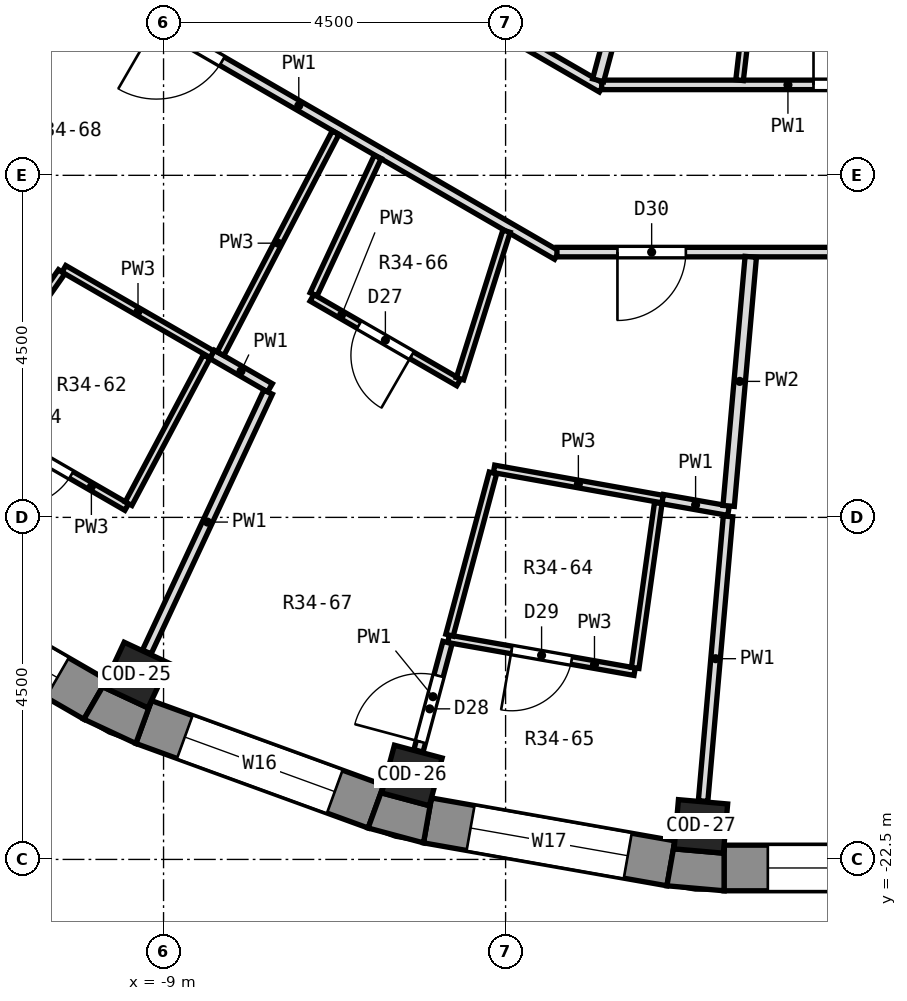
"""IFC4 building model, lengths in metres.
Left out: names, types, materials, properties, quantities, classifications, styles, units other than length and angle.
Written with IfcOpenShell. Run it as: python <this file> out.ifc"""

import sys

from ifc_helpers import new_model, si_unit, direction, frame, frame_2d, origin, origin_2d, place, context, subcontext, project, spatial, polyline, rectangle, outline, extrude, element, fill, save


model = new_model("IFC4")
c1 = context("Model", 3, precision=1e-05, world=origin(), true_north=direction((0.0, 1.0)))
c2 = subcontext(c1, "Body", "Model", "MODEL_VIEW")
j1 = project(units=[si_unit("LENGTHUNIT", "METRE"), si_unit("PLANEANGLEUNIT", "RADIAN")], contexts=[c1])
p1 = place(None, origin())
s1 = spatial("IfcSite", under=j1, at=p1, CompositionType="ELEMENT")
p2 = place(p1, origin())
s2 = spatial("IfcBuilding", under=s1, at=p2, CompositionType="ELEMENT")
p3 = place(p2, frame((0.0, 0.0, 239.6)))
s3 = spatial("IfcBuildingStorey", under=s2, at=p3, CompositionType="ELEMENT", Elevation=239.6)
for number, where, z_axis, x_axis in (
    (1, (-9.361, -20.075, 0.0), (0.0, 0.0, 1.0), (-0.423, -0.906, 0.0)),
    (2, (-5.733, -21.395, 0.0), (0.0, 0.0, 1.0), (-0.259, -0.966, 0.0)),
    (3, (-1.93, -22.066, 0.0), (0.0, 0.0, 1.0), (-0.087, -0.996, 0.0)),
):
    element("IfcColumn", number, at=place(p3, frame(where, z_axis=z_axis, x_axis=x_axis)), inside=s3, PredefinedType="COLUMN", context=c2, shape_type="SweptSolid", body=[
        extrude(rectangle(XDim=0.65, YDim=0.65, at=origin_2d()), origin(), (0.0, 0.0, 1.0), 3.3),
    ])
p4 = place(p3, frame((-12.714, -18.77, 0.0), z_axis=(0.0, 0.0, 1.0), x_axis=(0.866016800201, -0.500014901547, 0.0)))
e4 = element("IfcWall", 4, at=p4, inside=s3, PredefinedType="SOLIDWALL", context=c2, shape_type="SweptSolid", body=[
    extrude(rectangle(XDim=3.252, YDim=0.6, at=frame_2d((1.626, 0.0))), origin(), (0.0, 0.0, 1.0), 2.9),
])
p5 = place(p4, frame((0.576, 0.0, 0.9)))
e5 = element("IfcOpeningElement", 5, at=p5, cuts=e4, PredefinedType="OPENING", context=c2, shape_type="SweptSolid", body=[
    extrude(rectangle(XDim=2.1, YDim=1.8, at=frame_2d((1.05, 0.9))), frame((0.0, 0.312, 0.0), z_axis=(0.0, -1.0, 0.0), x_axis=(1.0, 0.0, 0.0)), (0.0, 0.0, 1.0), 0.624),
])
p6 = place(p3, frame((-9.262, -20.693, 0.0), z_axis=(0.0, 0.0, 1.0), x_axis=(0.939679383794, -0.342056509473, 0.0)))
e6 = element("IfcWall", 6, at=p6, inside=s3, PredefinedType="SOLIDWALL", context=c2, shape_type="SweptSolid", body=[
    extrude(rectangle(XDim=3.252, YDim=0.6, at=frame_2d((1.626, 0.0))), origin(), (0.0, 0.0, 1.0), 2.9),
])
p7 = place(p6, frame((0.576, 0.0, 0.9)))
e7 = element("IfcOpeningElement", 7, at=p7, cuts=e6, PredefinedType="OPENING", context=c2, shape_type="SweptSolid", body=[
    extrude(rectangle(XDim=2.1, YDim=1.8, at=frame_2d((1.05, 0.9))), frame((0.0, 0.312, 0.0), z_axis=(0.0, -1.0, 0.0), x_axis=(1.0, 0.0, 0.0)), (0.0, 0.0, 1.0), 0.624),
])
p8 = place(p3, frame((-5.528, -21.987, 0.0), z_axis=(0.0, 0.0, 1.0), x_axis=(0.984806225186, -0.173656842178, 0.0)))
e8 = element("IfcWall", 8, at=p8, inside=s3, PredefinedType="SOLIDWALL", context=c2, shape_type="SweptSolid", body=[
    extrude(rectangle(XDim=3.252, YDim=0.6, at=frame_2d((1.626, 0.0))), origin(), (0.0, 0.0, 1.0), 2.9),
])
p9 = place(p8, frame((0.576, 0.0, 0.9)))
e9 = element("IfcOpeningElement", 9, at=p9, cuts=e8, PredefinedType="OPENING", context=c2, shape_type="SweptSolid", body=[
    extrude(rectangle(XDim=2.1, YDim=1.8, at=frame_2d((1.05, 0.9))), frame((0.0, 0.312, 0.0), z_axis=(0.0, -1.0, 0.0), x_axis=(1.0, 0.0, 0.0)), (0.0, 0.0, 1.0), 0.624),
])
p10 = place(p3, frame((-1.626, -22.613, 0.0), z_axis=(0.0, 0.0, 1.0), x_axis=(1.0, 0.0, 0.0)))
e10 = element("IfcWall", 10, at=p10, inside=s3, PredefinedType="SOLIDWALL", context=c2, shape_type="SweptSolid", body=[
    extrude(rectangle(XDim=3.251, YDim=0.6, at=frame_2d((1.626, 0.0))), origin(), (0.0, 0.0, 1.0), 2.9),
])
p11 = place(p10, frame((0.576, 0.0, 0.9)))
e11 = element("IfcOpeningElement", 11, at=p11, cuts=e10, PredefinedType="OPENING", context=c2, shape_type="SweptSolid", body=[
    extrude(rectangle(XDim=2.1, YDim=1.8, at=frame_2d((1.05, 0.9))), frame((0.0, 0.312, 0.0), z_axis=(0.0, -1.0, 0.0), x_axis=(1.0, 0.0, 0.0)), (0.0, 0.0, 1.0), 0.624),
])
p12 = place(p3, origin())
e12 = element("IfcWall", 12, at=p12, inside=s3, PredefinedType="SOLIDWALL", context=c2, shape_type="SweptSolid", body=[
    extrude(outline(polyline([(-10.048, -20.656), (-9.364, -20.975), (-9.159, -20.411), (-9.204, -20.507), (-9.793, -20.232), (-9.748, -20.136), (-10.048, -20.656)])), origin(), (0.0, 0.0, 1.0), 2.9),
])
p13 = place(p3, origin())
e13 = element("IfcWall", 13, at=p13, inside=s3, PredefinedType="SOLIDWALL", context=c2, shape_type="SweptSolid", body=[
    extrude(outline(polyline([(-5.58, -22.282), (-5.476, -21.691), (-5.503, -21.793), (-6.131, -21.625), (-6.104, -21.523), (-6.309, -22.087), (-5.58, -22.282)])), origin(), (0.0, 0.0, 1.0), 2.9),
])
p14 = place(p3, origin())
e14 = element("IfcWall", 14, at=p14, inside=s3, PredefinedType="SOLIDWALL", context=c2, shape_type="SweptSolid", body=[
    extrude(outline(polyline([(-2.378, -22.847), (-1.626, -22.913), (-1.626, -22.312), (-1.635, -22.418), (-2.283, -22.361), (-2.273, -22.256), (-2.378, -22.847)])), origin(), (0.0, 0.0, 1.0), 2.9),
])
p15 = place(p3, frame((-10.618, -10.615, 0.0), z_axis=(0.0, 0.0, 1.0), x_axis=(0.865323364785, -0.501214000561, 0.0)))
e15 = element("IfcWall", 15, at=p15, inside=s3, PredefinedType="PARTITIONING", context=c2, shape_type="SweptSolid", body=[
    extrude(rectangle(XDim=7.851, YDim=0.125, at=frame_2d((3.926, 0.0))), origin(), (0.0, 0.0, 1.0), 2.9),
])
p16 = place(p15, frame((1.76, 0.0, 0.0)))
e16 = element("IfcOpeningElement", 16, at=p16, cuts=e15, PredefinedType="OPENING", context=c2, shape_type="SweptSolid", body=[
    extrude(rectangle(XDim=1.0, YDim=2.1, at=frame_2d((0.5, 1.05))), frame((0.0, 0.074, 0.0), z_axis=(0.0, -1.0, 0.0), x_axis=(1.0, 0.0, 0.0)), (0.0, 0.0, 1.0), 0.149),
])
p17 = place(p3, frame((-8.953, -9.036, 0.0), z_axis=(0.0, 0.0, 1.0), x_axis=(0.865185064951, -0.501452693068, 0.0)))
e17 = element("IfcWall", 17, at=p17, inside=s3, PredefinedType="PARTITIONING", context=c2, shape_type="SweptSolid", body=[
    extrude(rectangle(XDim=6.609, YDim=0.125, at=frame_2d((3.304, 0.0))), origin(), (0.0, 0.0, 1.0), 2.9),
])
p18 = place(p17, frame((2.685, 0.0, 0.0)))
e18 = element("IfcOpeningElement", 18, at=p18, cuts=e17, PredefinedType="OPENING", context=c2, shape_type="SweptSolid", body=[
    extrude(rectangle(XDim=1.0, YDim=2.1, at=frame_2d((0.5, 1.05))), frame((0.0, 0.074, 0.0), z_axis=(0.0, -1.0, 0.0), x_axis=(1.0, 0.0, 0.0)), (0.0, 0.0, 1.0), 0.149),
])
p19 = place(p3, frame((-11.638, -16.62, 0.0), z_axis=(0.0, 0.0, 1.0), x_axis=(0.865981260576, -0.500076450486, 0.0)))
e19 = element("IfcWall", 19, at=p19, inside=s3, PredefinedType="PARTITIONING", context=c2, shape_type="SweptSolid", body=[
    extrude(rectangle(XDim=2.487, YDim=0.1, at=frame_2d((1.244, 0.0))), origin(), (0.0, 0.0, 1.0), 2.9),
])
p20 = place(p19, frame((0.844, 0.0, 0.0)))
e20 = element("IfcOpeningElement", 20, at=p20, cuts=e19, PredefinedType="OPENING", context=c2, shape_type="SweptSolid", body=[
    extrude(rectangle(XDim=0.8, YDim=2.1, at=frame_2d((0.4, 1.05))), frame((0.0, 0.062, 0.0), z_axis=(0.0, -1.0, 0.0), x_axis=(1.0, 0.0, 0.0)), (0.0, 0.0, 1.0), 0.124),
])
p21 = place(p3, frame((-10.311, -14.73, 0.0), z_axis=(0.0, 0.0, 1.0), x_axis=(0.866073680794, -0.499916372443, 0.0)))
e21 = element("IfcWall", 21, at=p21, inside=s3, PredefinedType="PARTITIONING", context=c2, shape_type="SweptSolid", body=[
    extrude(rectangle(XDim=2.252, YDim=0.1, at=frame_2d((1.126, 0.0))), origin(), (0.0, 0.0, 1.0), 2.9),
])
p22 = place(p3, frame((-8.361, -15.856, 0.0), z_axis=(0.0, 0.0, 1.0), x_axis=(0.865838315616, -0.500323906295, 0.0)))
e22 = element("IfcWall", 22, at=p22, inside=s3, PredefinedType="PARTITIONING", context=c2, shape_type="SweptSolid", body=[
    extrude(rectangle(XDim=0.878, YDim=0.125, at=frame_2d((0.439, 0.0))), origin(), (0.0, 0.0, 1.0), 2.9),
])
p23 = place(p3, frame((-7.047, -15.111, 0.0), z_axis=(0.0, 0.0, 1.0), x_axis=(0.866015874633, -0.500016504612, 0.0)))
e23 = element("IfcWall", 23, at=p23, inside=s3, PredefinedType="PARTITIONING", context=c2, shape_type="SweptSolid", body=[
    extrude(rectangle(XDim=2.228, YDim=0.1, at=frame_2d((1.114, 0.0))), origin(), (0.0, 0.0, 1.0), 2.9),
])
p24 = place(p23, frame((0.715, 0.0, 0.0)))
e24 = element("IfcOpeningElement", 24, at=p24, cuts=e23, PredefinedType="OPENING", context=c2, shape_type="SweptSolid", body=[
    extrude(rectangle(XDim=0.8, YDim=2.1, at=frame_2d((0.4, 1.05))), frame((0.0, 0.062, 0.0), z_axis=(0.0, -1.0, 0.0), x_axis=(1.0, 0.0, 0.0)), (0.0, 0.0, 1.0), 0.124),
])
p25 = place(p3, frame((-4.652, -17.362, 0.0), z_axis=(0.0, 0.0, 1.0), x_axis=(0.984302107819, -0.176491814379, 0.0)))
e25 = element("IfcWall", 25, at=p25, inside=s3, PredefinedType="PARTITIONING", context=c2, shape_type="SweptSolid", body=[
    extrude(rectangle(XDim=2.253, YDim=0.1, at=frame_2d((1.127, 0.0))), origin(), (0.0, 0.0, 1.0), 2.9),
])
p26 = place(p3, frame((-5.251, -19.598, 0.0), z_axis=(0.0, 0.0, 1.0), x_axis=(0.984786523671, -0.17376853224, 0.0)))
e26 = element("IfcWall", 26, at=p26, inside=s3, PredefinedType="PARTITIONING", context=c2, shape_type="SweptSolid", body=[
    extrude(rectangle(XDim=2.487, YDim=0.1, at=frame_2d((1.243, 0.0))), origin(), (0.0, 0.0, 1.0), 2.9),
])
p27 = place(p26, frame((0.844, 0.0, 0.0)))
e27 = element("IfcOpeningElement", 27, at=p27, cuts=e26, PredefinedType="OPENING", context=c2, shape_type="SweptSolid", body=[
    extrude(rectangle(XDim=0.8, YDim=2.1, at=frame_2d((0.4, 1.05))), frame((0.0, 0.062, 0.0), z_axis=(0.0, -1.0, 0.0), x_axis=(1.0, 0.0, 0.0)), (0.0, 0.0, 1.0), 0.124),
])
p28 = place(p3, frame((-2.434, -17.76, 0.0), z_axis=(0.0, 0.0, 1.0), x_axis=(0.984908951539, -0.173073271124, 0.0)))
e28 = element("IfcWall", 28, at=p28, inside=s3, PredefinedType="PARTITIONING", context=c2, shape_type="SweptSolid", body=[
    extrude(rectangle(XDim=0.88, YDim=0.125, at=frame_2d((0.44, 0.0))), origin(), (0.0, 0.0, 1.0), 2.9),
])
p29 = place(p3, frame((-3.824, -14.51, 0.0), z_axis=(0.0, 0.0, 1.0), x_axis=(1.0, 0.0, 0.0)))
e29 = element("IfcWall", 29, at=p29, inside=s3, PredefinedType="PARTITIONING", context=c2, shape_type="SweptSolid", body=[
    extrude(rectangle(XDim=7.785, YDim=0.125, at=frame_2d((3.892, 0.0))), origin(), (0.0, 0.0, 1.0), 2.9),
])
p30 = place(p29, frame((0.796, 0.0, 0.0)))
e30 = element("IfcOpeningElement", 30, at=p30, cuts=e29, PredefinedType="OPENING", context=c2, shape_type="SweptSolid", body=[
    extrude(rectangle(XDim=0.9, YDim=2.1, at=frame_2d((0.45, 1.05))), frame((0.0, 0.074, 0.0), z_axis=(0.0, -1.0, 0.0), x_axis=(1.0, 0.0, 0.0)), (0.0, 0.0, 1.0), 0.149),
])
p31 = place(p29, frame((4.634, 0.0, 0.0)))
e31 = element("IfcOpeningElement", 31, at=p31, cuts=e29, PredefinedType="OPENING", context=c2, shape_type="SweptSolid", body=[
    extrude(rectangle(XDim=1.0, YDim=2.1, at=frame_2d((0.5, 1.05))), frame((0.0, 0.074, 0.0), z_axis=(0.0, -1.0, 0.0), x_axis=(1.0, 0.0, 0.0)), (0.0, 0.0, 1.0), 0.149),
])
p32 = place(p3, frame((-3.236, -12.31, 0.0), z_axis=(0.0, 0.0, 1.0), x_axis=(1.0, 0.0, 0.0)))
e32 = element("IfcWall", 32, at=p32, inside=s3, PredefinedType="PARTITIONING", context=c2, shape_type="SweptSolid", body=[
    extrude(rectangle(XDim=6.62, YDim=0.125, at=frame_2d((3.31, 0.0))), origin(), (0.0, 0.0, 1.0), 2.9),
])
p33 = place(p32, frame((2.787, 0.0, 0.0)))
e33 = element("IfcOpeningElement", 33, at=p33, cuts=e32, PredefinedType="OPENING", context=c2, shape_type="SweptSolid", body=[
    extrude(rectangle(XDim=1.0, YDim=2.1, at=frame_2d((0.5, 1.05))), frame((0.0, 0.074, 0.0), z_axis=(0.0, -1.0, 0.0), x_axis=(1.0, 0.0, 0.0)), (0.0, 0.0, 1.0), 0.149),
])
p34 = place(p3, frame((-11.609, -16.579, 0.0), z_axis=(0.0, 0.0, 1.0), x_axis=(0.574033341126, 0.818831926146, 0.0)))
e34 = element("IfcWall", 34, at=p34, inside=s3, PredefinedType="PARTITIONING", context=c2, shape_type="SweptSolid", body=[
    extrude(rectangle(XDim=2.209, YDim=0.1, at=frame_2d((1.104, 0.0))), origin(), (0.0, 0.0, 1.0), 2.9),
])
p35 = place(p3, frame((-9.46, -17.82, 0.0), z_axis=(0.0, 0.0, 1.0), x_axis=(0.469111743442, 0.883138818174, 0.0)))
e35 = element("IfcWall", 35, at=p35, inside=s3, PredefinedType="PARTITIONING", context=c2, shape_type="SweptSolid", body=[
    extrude(rectangle(XDim=2.189, YDim=0.1, at=frame_2d((1.095, 0.0))), origin(), (0.0, 0.0, 1.0), 2.9),
])
p36 = place(p3, frame((-8.25, -15.847, 0.0), z_axis=(0.0, 0.0, 1.0), x_axis=(0.461751333764, 0.887009416955, 0.0)))
e36 = element("IfcWall", 36, at=p36, inside=s3, PredefinedType="PARTITIONING", context=c2, shape_type="SweptSolid", body=[
    extrude(rectangle(XDim=3.278, YDim=0.1, at=frame_2d((1.639, 0.0))), origin(), (0.0, 0.0, 1.0), 2.9),
])
p37 = place(p3, frame((-9.22, -19.771, 0.0), z_axis=(0.0, 0.0, 1.0), x_axis=(0.422998854506, 0.906130216408, 0.0)))
e37 = element("IfcWall", 37, at=p37, inside=s3, PredefinedType="PARTITIONING", context=c2, shape_type="SweptSolid", body=[
    extrude(rectangle(XDim=3.772, YDim=0.125, at=frame_2d((1.886, 0.0))), origin(), (0.0, 0.0, 1.0), 2.9),
])
p38 = place(p3, frame((-7.026, -15.066, 0.0), z_axis=(0.0, 0.0, 1.0), x_axis=(0.422771582019, 0.906236276827, 0.0)))
e38 = element("IfcWall", 38, at=p38, inside=s3, PredefinedType="PARTITIONING", context=c2, shape_type="SweptSolid", body=[
    extrude(rectangle(XDim=1.995, YDim=0.1, at=frame_2d((0.998, 0.0))), origin(), (0.0, 0.0, 1.0), 2.9),
])
p39 = place(p3, frame((-5.1, -16.176, 0.0), z_axis=(0.0, 0.0, 1.0), x_axis=(0.300861627233, 0.953667804457, 0.0)))
e39 = element("IfcWall", 39, at=p39, inside=s3, PredefinedType="PARTITIONING", context=c2, shape_type="SweptSolid", body=[
    extrude(rectangle(XDim=2.036, YDim=0.1, at=frame_2d((1.018, 0.0))), origin(), (0.0, 0.0, 1.0), 2.9),
])
p40 = place(p3, frame((-5.646, -21.072, 0.0), z_axis=(0.0, 0.0, 1.0), x_axis=(0.259237722608, 0.965813544726, 0.0)))
e40 = element("IfcWall", 40, at=p40, inside=s3, PredefinedType="PARTITIONING", context=c2, shape_type="SweptSolid", body=[
    extrude(rectangle(XDim=1.476, YDim=0.125, at=frame_2d((0.738, 0.0))), origin(), (0.0, 0.0, 1.0), 2.9),
])
p41 = place(p40, frame((0.122, 0.0, 0.0)))
e41 = element("IfcOpeningElement", 41, at=p41, cuts=e40, PredefinedType="OPENING", context=c2, shape_type="SweptSolid", body=[
    extrude(rectangle(XDim=0.9, YDim=2.1, at=frame_2d((0.45, 1.05))), frame((0.0, 0.074, 0.0), z_axis=(0.0, -1.0, 0.0), x_axis=(1.0, 0.0, 0.0)), (0.0, 0.0, 1.0), 0.149),
])
p42 = place(p3, frame((-5.238, -19.55, 0.0), z_axis=(0.0, 0.0, 1.0), x_axis=(0.258653207269, 0.965970247145, 0.0)))
e42 = element("IfcWall", 42, at=p42, inside=s3, PredefinedType="PARTITIONING", context=c2, shape_type="SweptSolid", body=[
    extrude(rectangle(XDim=2.209, YDim=0.1, at=frame_2d((1.104, 0.0))), origin(), (0.0, 0.0, 1.0), 2.9),
])
p43 = place(p3, frame((-3.282, -12.25, 0.0), z_axis=(0.0, 0.0, 1.0), x_axis=(0.258727295272, 0.965950405912, 0.0)))
e43 = element("IfcWall", 43, at=p43, inside=s3, PredefinedType="PARTITIONING", context=c2, shape_type="SweptSolid", body=[
    extrude(rectangle(XDim=3.24, YDim=0.15, at=frame_2d((1.62, 0.0))), origin(), (0.0, 0.0, 1.0), 2.9),
])
p44 = place(p3, frame((-2.795, -19.98, 0.0), z_axis=(0.0, 0.0, 1.0), x_axis=(0.138656596978, 0.990340521293, 0.0)))
e44 = element("IfcWall", 44, at=p44, inside=s3, PredefinedType="PARTITIONING", context=c2, shape_type="SweptSolid", body=[
    extrude(rectangle(XDim=2.189, YDim=0.1, at=frame_2d((1.094, 0.0))), origin(), (0.0, 0.0, 1.0), 2.9),
])
p45 = place(p3, frame((-1.422, -12.248, 0.0), z_axis=(0.0, 0.0, 1.0), x_axis=(0.115209091431, 0.993341263238, 0.0)))
e45 = element("IfcWall", 45, at=p45, inside=s3, PredefinedType="PARTITIONING", context=c2, shape_type="SweptSolid", body=[
    extrude(rectangle(XDim=1.901, YDim=0.1, at=frame_2d((0.95, 0.0))), origin(), (0.0, 0.0, 1.0), 2.9),
])
p46 = place(p45, frame((0.544, 0.0, 0.0)))
e46 = element("IfcOpeningElement", 46, at=p46, cuts=e45, PredefinedType="OPENING", context=c2, shape_type="SweptSolid", body=[
    extrude(rectangle(XDim=0.8, YDim=2.1, at=frame_2d((0.4, 1.05))), frame((0.0, 0.062, 0.0), z_axis=(0.0, -1.0, 0.0), x_axis=(1.0, 0.0, 0.0)), (0.0, 0.0, 1.0), 0.124),
])
p47 = place(p3, frame((-1.565, -17.849, 0.0), z_axis=(0.0, 0.0, 1.0), x_axis=(0.088454711903, 0.996080199553, 0.0)))
e47 = element("IfcWall", 47, at=p47, inside=s3, PredefinedType="PARTITIONING", context=c2, shape_type="SweptSolid", body=[
    extrude(rectangle(XDim=3.29, YDim=0.15, at=frame_2d((1.645, 0.0))), origin(), (0.0, 0.0, 1.0), 2.9),
])
p48 = place(p3, frame((-1.902, -21.732, 0.0), z_axis=(0.0, 0.0, 1.0), x_axis=(0.087279731719, 0.996183842687, 0.0)))
e48 = element("IfcWall", 48, at=p48, inside=s3, PredefinedType="PARTITIONING", context=c2, shape_type="SweptSolid", body=[
    extrude(rectangle(XDim=3.76, YDim=0.125, at=frame_2d((1.88, 0.0))), origin(), (0.0, 0.0, 1.0), 2.9),
])
p49 = place(p5, origin())
e49 = element("IfcWindow", 49, at=p49, inside=s3, PartitioningType="SINGLE_PANEL", PredefinedType="WINDOW", context=c2, shape_type="SweptSolid", body=[
    extrude(rectangle(XDim=2.1, YDim=1.8, at=frame_2d((1.05, 0.9))), frame((0.0, 0.18, 0.0), z_axis=(0.0, -1.0, 0.0), x_axis=(1.0, 0.0, 0.0)), (0.0, 0.0, 1.0), 0.06),
])
fill(e5, e49)
p50 = place(p7, origin())
e50 = element("IfcWindow", 50, at=p50, inside=s3, PartitioningType="SINGLE_PANEL", PredefinedType="WINDOW", context=c2, shape_type="SweptSolid", body=[
    extrude(rectangle(XDim=2.1, YDim=1.8, at=frame_2d((1.05, 0.9))), frame((0.0, 0.18, 0.0), z_axis=(0.0, -1.0, 0.0), x_axis=(1.0, 0.0, 0.0)), (0.0, 0.0, 1.0), 0.06),
])
fill(e7, e50)
p51 = place(p9, origin())
e51 = element("IfcWindow", 51, at=p51, inside=s3, PartitioningType="SINGLE_PANEL", PredefinedType="WINDOW", context=c2, shape_type="SweptSolid", body=[
    extrude(rectangle(XDim=2.1, YDim=1.8, at=frame_2d((1.05, 0.9))), frame((0.0, 0.18, 0.0), z_axis=(0.0, -1.0, 0.0), x_axis=(1.0, 0.0, 0.0)), (0.0, 0.0, 1.0), 0.06),
])
fill(e9, e51)
p52 = place(p11, origin())
e52 = element("IfcWindow", 52, at=p52, inside=s3, PartitioningType="SINGLE_PANEL", PredefinedType="WINDOW", context=c2, shape_type="SweptSolid", body=[
    extrude(rectangle(XDim=2.1, YDim=1.8, at=frame_2d((1.05, 0.9))), frame((0.0, 0.18, 0.0), z_axis=(0.0, -1.0, 0.0), x_axis=(1.0, 0.0, 0.0)), (0.0, 0.0, 1.0), 0.06),
])
fill(e11, e52)
p53 = place(p16, frame((1.0, 0.0, 0.0), z_axis=(0.0, 0.0, 1.0), x_axis=(-1.0, 0.0, 0.0)))
e53 = element("IfcDoor", 53, at=p53, inside=s3, OperationType="SINGLE_SWING_RIGHT", PredefinedType="DOOR", context=c2, shape_type="SweptSolid", body=[
    extrude(rectangle(XDim=1.0, YDim=2.1, at=frame_2d((0.5, 1.05))), frame((0.0, 0.025, 0.0), z_axis=(0.0, -1.0, 0.0), x_axis=(1.0, 0.0, 0.0)), (0.0, 0.0, 1.0), 0.05),
])
fill(e16, e53)
p54 = place(p20, frame((0.8, 0.0, 0.0), z_axis=(0.0, 0.0, 1.0), x_axis=(-1.0, 0.0, 0.0)))
e54 = element("IfcDoor", 54, at=p54, inside=s3, OperationType="SINGLE_SWING_RIGHT", PredefinedType="DOOR", context=c2, shape_type="SweptSolid", body=[
    extrude(rectangle(XDim=0.8, YDim=2.1, at=frame_2d((0.4, 1.05))), frame((0.0, 0.025, 0.0), z_axis=(0.0, -1.0, 0.0), x_axis=(1.0, 0.0, 0.0)), (0.0, 0.0, 1.0), 0.05),
])
fill(e20, e54)
p55 = place(p24, frame((0.8, 0.0, 0.0), z_axis=(0.0, 0.0, 1.0), x_axis=(-1.0, 0.0, 0.0)))
e55 = element("IfcDoor", 55, at=p55, inside=s3, OperationType="SINGLE_SWING_LEFT", PredefinedType="DOOR", context=c2, shape_type="SweptSolid", body=[
    extrude(rectangle(XDim=0.8, YDim=2.1, at=frame_2d((0.4, 1.05))), frame((0.0, 0.025, 0.0), z_axis=(0.0, -1.0, 0.0), x_axis=(1.0, 0.0, 0.0)), (0.0, 0.0, 1.0), 0.05),
])
fill(e24, e55)
p56 = place(p41, origin())
e56 = element("IfcDoor", 56, at=p56, inside=s3, OperationType="SINGLE_SWING_LEFT", PredefinedType="DOOR", context=c2, shape_type="SweptSolid", body=[
    extrude(rectangle(XDim=0.9, YDim=2.1, at=frame_2d((0.45, 1.05))), frame((0.0, 0.025, 0.0), z_axis=(0.0, -1.0, 0.0), x_axis=(1.0, 0.0, 0.0)), (0.0, 0.0, 1.0), 0.05),
])
fill(e41, e56)
p57 = place(p27, frame((0.8, 0.0, 0.0), z_axis=(0.0, 0.0, 1.0), x_axis=(-1.0, 0.0, 0.0)))
e57 = element("IfcDoor", 57, at=p57, inside=s3, OperationType="SINGLE_SWING_RIGHT", PredefinedType="DOOR", context=c2, shape_type="SweptSolid", body=[
    extrude(rectangle(XDim=0.8, YDim=2.1, at=frame_2d((0.4, 1.05))), frame((0.0, 0.025, 0.0), z_axis=(0.0, -1.0, 0.0), x_axis=(1.0, 0.0, 0.0)), (0.0, 0.0, 1.0), 0.05),
])
fill(e27, e57)
p58 = place(p30, frame((0.9, 0.0, 0.0), z_axis=(0.0, 0.0, 1.0), x_axis=(-1.0, 0.0, 0.0)))
e58 = element("IfcDoor", 58, at=p58, inside=s3, OperationType="SINGLE_SWING_RIGHT", PredefinedType="DOOR", context=c2, shape_type="SweptSolid", body=[
    extrude(rectangle(XDim=0.9, YDim=2.1, at=frame_2d((0.45, 1.05))), frame((0.0, 0.025, 0.0), z_axis=(0.0, -1.0, 0.0), x_axis=(1.0, 0.0, 0.0)), (0.0, 0.0, 1.0), 0.05),
])
fill(e30, e58)
p59 = place(p33, origin())
e59 = element("IfcDoor", 59, at=p59, inside=s3, OperationType="SINGLE_SWING_LEFT", PredefinedType="DOOR", context=c2, shape_type="SweptSolid", body=[
    extrude(rectangle(XDim=1.0, YDim=2.1, at=frame_2d((0.5, 1.05))), frame((0.0, 0.025, 0.0), z_axis=(0.0, -1.0, 0.0), x_axis=(1.0, 0.0, 0.0)), (0.0, 0.0, 1.0), 0.05),
])
fill(e33, e59)
save(model, sys.argv[1])
